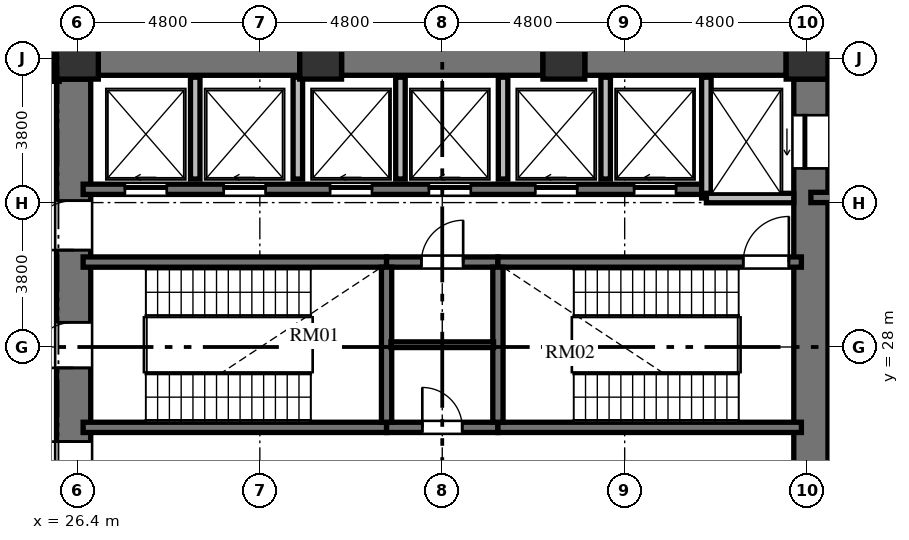
"""IFC4 building model, lengths in metres.
Left out: names, types, materials, properties, quantities, classifications, styles, units other than length and angle.
Written with IfcOpenShell. Run it as: python <this file> out.ifc"""

import sys

from ifc_helpers import new_model, si_unit, direction, frame, frame_2d, origin, origin_2d, place, context, subcontext, project, spatial, rectangle, extrude, element, fill, save


model = new_model("IFC4")
c1 = context("Model", 3, precision=1e-05, world=origin(), true_north=direction((0.0, 1.0)))
c2 = subcontext(c1, "Body", "Model", "MODEL_VIEW")
j1 = project(units=[si_unit("LENGTHUNIT", "METRE"), si_unit("PLANEANGLEUNIT", "RADIAN")], contexts=[c1])
p1 = place(None, origin())
s1 = spatial("IfcSite", under=j1, at=p1, CompositionType="ELEMENT")
p2 = place(p1, origin())
s2 = spatial("IfcBuilding", under=s1, at=p2, CompositionType="ELEMENT")
p3 = place(p2, frame((0.0, 0.0, 6.0)))
s3 = spatial("IfcBuildingStorey", under=s2, at=p3, CompositionType="ELEMENT", Elevation=6.0)
for number, where, z_axis, x_axis in (
    (1, (45.6, 35.6, 0.0), (0.0, 0.0, 1.0), (1.0, 0.0, 0.0)),
    (2, (39.2, 35.6, 0.0), (0.0, 0.0, 1.0), (1.0, 0.0, 0.0)),
    (3, (32.8, 35.6, 0.0), (0.0, 0.0, 1.0), (1.0, 0.0, 0.0)),
    (4, (26.4, 35.6, 0.0), (0.0, 0.0, 1.0), (1.0, 0.0, 0.0)),
):
    element("IfcColumn", number, at=place(p3, frame(where, z_axis=z_axis, x_axis=x_axis)), inside=s3, PredefinedType="COLUMN", context=c2, shape_type="SweptSolid", body=[
        extrude(rectangle(XDim=1.1, YDim=1.1, at=origin_2d()), origin(), (0.0, 0.0, 1.0), 4.8),
    ])
p4 = place(p3, frame((26.3, 20.95, 0.0), z_axis=(0.0, 0.0, 1.0), x_axis=(0.0, 1.0, 0.0)))
e5 = element("IfcWall", 5, at=p4, inside=s3, PredefinedType="SHEAR", context=c2, shape_type="SweptSolid", body=[
    extrude(rectangle(XDim=14.1, YDim=0.9, at=frame_2d((7.05, 0.0))), origin(), (0.0, 0.0, 1.0), 4.8),
])
p5 = place(p4, frame((6.5, 0.0, 0.0)))
e6 = element("IfcOpeningElement", 6, at=p5, cuts=e5, PredefinedType="OPENING", context=c2, shape_type="SweptSolid", body=[
    extrude(rectangle(XDim=1.2, YDim=2.15, at=frame_2d((0.6, 1.075))), frame((0.0, 0.46, 0.0), z_axis=(0.0, -1.0, 0.0), x_axis=(1.0, 0.0, 0.0)), (0.0, 0.0, 1.0), 0.92),
])
p6 = place(p4, frame((9.6, 0.0, 0.0)))
e7 = element("IfcOpeningElement", 7, at=p6, cuts=e5, PredefinedType="OPENING", context=c2, shape_type="SweptSolid", body=[
    extrude(rectangle(XDim=1.3, YDim=2.2, at=frame_2d((0.65, 1.1))), frame((0.0, 0.46, 0.0), z_axis=(0.0, -1.0, 0.0), x_axis=(1.0, 0.0, 0.0)), (0.0, 0.0, 1.0), 0.92),
])
p7 = place(p4, frame((3.26, 0.0, 0.0)))
e8 = element("IfcOpeningElement", 8, at=p7, cuts=e5, PredefinedType="OPENING", context=c2, shape_type="SweptSolid", body=[
    extrude(rectangle(XDim=1.3, YDim=2.2, at=frame_2d((0.65, 1.1))), frame((0.0, 0.46, 0.0), z_axis=(0.0, -1.0, 0.0), x_axis=(1.0, 0.0, 0.0)), (0.0, 0.0, 1.0), 0.92),
])
p8 = place(p3, frame((45.7, 20.95, 0.0), z_axis=(0.0, 0.0, 1.0), x_axis=(0.0, 1.0, 0.0)))
e9 = element("IfcWall", 9, at=p8, inside=s3, PredefinedType="SHEAR", context=c2, shape_type="SweptSolid", body=[
    extrude(rectangle(XDim=14.1, YDim=0.9, at=frame_2d((7.05, 0.0))), origin(), (0.0, 0.0, 1.0), 4.8),
])
p9 = place(p8, frame((11.75, 0.0, 0.0)))
e10 = element("IfcOpeningElement", 10, at=p9, cuts=e9, PredefinedType="OPENING", context=c2, shape_type="SweptSolid", body=[
    extrude(rectangle(XDim=1.4, YDim=2.3, at=frame_2d((0.7, 1.15))), frame((0.0, 0.46, 0.0), z_axis=(0.0, -1.0, 0.0), x_axis=(1.0, 0.0, 0.0)), (0.0, 0.0, 1.0), 0.92),
])
p10 = place(p8, frame((0.95, 0.0, 0.0)))
e11 = element("IfcOpeningElement", 11, at=p10, cuts=e9, PredefinedType="OPENING", context=c2, shape_type="SweptSolid", body=[
    extrude(rectangle(XDim=1.4, YDim=2.3, at=frame_2d((0.7, 1.15))), frame((0.0, 0.46, 0.0), z_axis=(0.0, -1.0, 0.0), x_axis=(1.0, 0.0, 0.0)), (0.0, 0.0, 1.0), 0.92),
])
p11 = place(p3, frame((26.95, 35.6, 0.0), z_axis=(0.0, 0.0, 1.0), x_axis=(1.0, 0.0, 0.0)))
e12 = element("IfcWall", 12, at=p11, inside=s3, PredefinedType="SHEAR", context=c2, shape_type="SweptSolid", body=[
    extrude(rectangle(XDim=5.3, YDim=0.9, at=frame_2d((2.65, 0.0))), origin(), (0.0, 0.0, 1.0), 4.8),
])
p12 = place(p3, frame((33.35, 35.6, 0.0), z_axis=(0.0, 0.0, 1.0), x_axis=(1.0, 0.0, 0.0)))
e13 = element("IfcWall", 13, at=p12, inside=s3, PredefinedType="SHEAR", context=c2, shape_type="SweptSolid", body=[
    extrude(rectangle(XDim=5.3, YDim=0.9, at=frame_2d((2.65, 0.0))), origin(), (0.0, 0.0, 1.0), 4.8),
])
p13 = place(p3, frame((39.75, 35.6, 0.0), z_axis=(0.0, 0.0, 1.0), x_axis=(1.0, 0.0, 0.0)))
e14 = element("IfcWall", 14, at=p13, inside=s3, PredefinedType="SHEAR", context=c2, shape_type="SweptSolid", body=[
    extrude(rectangle(XDim=5.3, YDim=0.9, at=frame_2d((2.65, 0.0))), origin(), (0.0, 0.0, 1.0), 4.8),
])
p14 = place(p3, frame((26.55, 30.235, 0.0), z_axis=(0.0, 0.0, 1.0), x_axis=(1.0, 0.0, 0.0)))
e15 = element("IfcWall", 15, at=p14, inside=s3, PredefinedType="SHEAR", context=c2, shape_type="SweptSolid", body=[
    extrude(rectangle(XDim=7.985, YDim=0.27, at=frame_2d((3.992, 0.0))), origin(), (0.0, 0.0, 1.0), 4.8),
])
p15 = place(p3, frame((34.535, 30.235, 0.0), z_axis=(0.0, 0.0, 1.0), x_axis=(1.0, 0.0, 0.0)))
e16 = element("IfcWall", 16, at=p15, inside=s3, PredefinedType="SHEAR", context=c2, shape_type="SweptSolid", body=[
    extrude(rectangle(XDim=2.93, YDim=0.27, at=frame_2d((1.465, 0.0))), origin(), (0.0, 0.0, 1.0), 4.8),
])
p16 = place(p15, frame((0.915, 0.0, 0.0)))
e17 = element("IfcOpeningElement", 17, at=p16, cuts=e16, PredefinedType="OPENING", context=c2, shape_type="SweptSolid", body=[
    extrude(rectangle(XDim=1.1, YDim=2.15, at=frame_2d((0.55, 1.075))), frame((0.0, 0.145, 0.0), z_axis=(0.0, -1.0, 0.0), x_axis=(1.0, 0.0, 0.0)), (0.0, 0.0, 1.0), 0.29),
])
p17 = place(p3, frame((37.465, 30.235, 0.0), z_axis=(0.0, 0.0, 1.0), x_axis=(1.0, 0.0, 0.0)))
e18 = element("IfcWall", 18, at=p17, inside=s3, PredefinedType="SHEAR", context=c2, shape_type="SweptSolid", body=[
    extrude(rectangle(XDim=7.985, YDim=0.27, at=frame_2d((3.992, 0.0))), origin(), (0.0, 0.0, 1.0), 4.8),
])
p18 = place(p17, frame((6.455, 0.0, 0.0)))
e19 = element("IfcOpeningElement", 19, at=p18, cuts=e18, PredefinedType="OPENING", context=c2, shape_type="SweptSolid", body=[
    extrude(rectangle(XDim=1.2, YDim=2.15, at=frame_2d((0.6, 1.075))), frame((0.0, 0.145, 0.0), z_axis=(0.0, -1.0, 0.0), x_axis=(1.0, 0.0, 0.0)), (0.0, 0.0, 1.0), 0.29),
])
p19 = place(p3, frame((26.55, 25.885, 0.0), z_axis=(0.0, 0.0, 1.0), x_axis=(1.0, 0.0, 0.0)))
e20 = element("IfcWall", 20, at=p19, inside=s3, PredefinedType="SHEAR", context=c2, shape_type="SweptSolid", body=[
    extrude(rectangle(XDim=7.985, YDim=0.27, at=frame_2d((3.992, 0.0))), origin(), (0.0, 0.0, 1.0), 4.8),
])
p20 = place(p3, frame((34.535, 25.885, 0.0), z_axis=(0.0, 0.0, 1.0), x_axis=(1.0, 0.0, 0.0)))
e21 = element("IfcWall", 21, at=p20, inside=s3, PredefinedType="SHEAR", context=c2, shape_type="SweptSolid", body=[
    extrude(rectangle(XDim=2.93, YDim=0.27, at=frame_2d((1.465, 0.0))), origin(), (0.0, 0.0, 1.0), 4.8),
])
p21 = place(p20, frame((0.94, 0.0, 0.0)))
e22 = element("IfcOpeningElement", 22, at=p21, cuts=e21, PredefinedType="OPENING", context=c2, shape_type="SweptSolid", body=[
    extrude(rectangle(XDim=1.05, YDim=2.15, at=frame_2d((0.525, 1.075))), frame((0.0, 0.145, 0.0), z_axis=(0.0, -1.0, 0.0), x_axis=(1.0, 0.0, 0.0)), (0.0, 0.0, 1.0), 0.29),
])
p22 = place(p3, frame((37.465, 25.885, 0.0), z_axis=(0.0, 0.0, 1.0), x_axis=(1.0, 0.0, 0.0)))
e23 = element("IfcWall", 23, at=p22, inside=s3, PredefinedType="SHEAR", context=c2, shape_type="SweptSolid", body=[
    extrude(rectangle(XDim=7.985, YDim=0.27, at=frame_2d((3.992, 0.0))), origin(), (0.0, 0.0, 1.0), 4.8),
])
for number, where, z_axis, x_axis in (
    (24, (34.535, 26.02, 0.0), (0.0, 0.0, 1.0), (0.0, 1.0, 0.0)),
    (25, (37.465, 26.02, 0.0), (0.0, 0.0, 1.0), (0.0, 1.0, 0.0)),
):
    element("IfcWall", number, at=place(p3, frame(where, z_axis=z_axis, x_axis=x_axis)), inside=s3, PredefinedType="SHEAR", context=c2, shape_type="SweptSolid", body=[
        extrude(rectangle(XDim=4.08, YDim=0.27, at=frame_2d((2.04, 0.0))), origin(), (0.0, 0.0, 1.0), 4.8),
    ])
p23 = place(p3, frame((34.65, 28.06, 0.0), z_axis=(0.0, 0.0, 1.0), x_axis=(1.0, 0.0, 0.0)))
e26 = element("IfcWall", 26, at=p23, inside=s3, PredefinedType="PARTITIONING", context=c2, shape_type="SweptSolid", body=[
    extrude(rectangle(XDim=2.7, YDim=0.15, at=frame_2d((1.35, 0.0))), origin(), (0.0, 0.0, 1.0), 4.52),
])
p24 = place(p3, frame((26.55, 32.15, 0.0), z_axis=(0.0, 0.0, 1.0), x_axis=(1.0, 0.0, 0.0)))
e27 = element("IfcWall", 27, at=p24, inside=s3, PredefinedType="SHEAR", context=c2, shape_type="SweptSolid", body=[
    extrude(rectangle(XDim=16.4, YDim=0.27, at=frame_2d((8.2, 0.0))), origin(), (0.0, 0.0, 1.0), 4.8),
])
p25 = place(p24, frame((1.1, 0.0, 0.0)))
e28 = element("IfcOpeningElement", 28, at=p25, cuts=e27, PredefinedType="OPENING", context=c2, shape_type="SweptSolid", body=[
    extrude(rectangle(XDim=1.1, YDim=2.2, at=frame_2d((0.55, 1.1))), frame((0.0, 0.145, 0.0), z_axis=(0.0, -1.0, 0.0), x_axis=(1.0, 0.0, 0.0)), (0.0, 0.0, 1.0), 0.29),
])
p26 = place(p24, frame((3.7, 0.0, 0.0)))
e29 = element("IfcOpeningElement", 29, at=p26, cuts=e27, PredefinedType="OPENING", context=c2, shape_type="SweptSolid", body=[
    extrude(rectangle(XDim=1.1, YDim=2.2, at=frame_2d((0.55, 1.1))), frame((0.0, 0.145, 0.0), z_axis=(0.0, -1.0, 0.0), x_axis=(1.0, 0.0, 0.0)), (0.0, 0.0, 1.0), 0.29),
])
p27 = place(p24, frame((6.5, 0.0, 0.0)))
e30 = element("IfcOpeningElement", 30, at=p27, cuts=e27, PredefinedType="OPENING", context=c2, shape_type="SweptSolid", body=[
    extrude(rectangle(XDim=1.1, YDim=2.2, at=frame_2d((0.55, 1.1))), frame((0.0, 0.145, 0.0), z_axis=(0.0, -1.0, 0.0), x_axis=(1.0, 0.0, 0.0)), (0.0, 0.0, 1.0), 0.29),
])
p28 = place(p24, frame((9.1, 0.0, 0.0)))
e31 = element("IfcOpeningElement", 31, at=p28, cuts=e27, PredefinedType="OPENING", context=c2, shape_type="SweptSolid", body=[
    extrude(rectangle(XDim=1.1, YDim=2.2, at=frame_2d((0.55, 1.1))), frame((0.0, 0.145, 0.0), z_axis=(0.0, -1.0, 0.0), x_axis=(1.0, 0.0, 0.0)), (0.0, 0.0, 1.0), 0.29),
])
p29 = place(p24, frame((11.9, 0.0, 0.0)))
e32 = element("IfcOpeningElement", 32, at=p29, cuts=e27, PredefinedType="OPENING", context=c2, shape_type="SweptSolid", body=[
    extrude(rectangle(XDim=1.1, YDim=2.2, at=frame_2d((0.55, 1.1))), frame((0.0, 0.145, 0.0), z_axis=(0.0, -1.0, 0.0), x_axis=(1.0, 0.0, 0.0)), (0.0, 0.0, 1.0), 0.29),
])
p30 = place(p24, frame((14.5, 0.0, 0.0)))
e33 = element("IfcOpeningElement", 33, at=p30, cuts=e27, PredefinedType="OPENING", context=c2, shape_type="SweptSolid", body=[
    extrude(rectangle(XDim=1.1, YDim=2.2, at=frame_2d((0.55, 1.1))), frame((0.0, 0.145, 0.0), z_axis=(0.0, -1.0, 0.0), x_axis=(1.0, 0.0, 0.0)), (0.0, 0.0, 1.0), 0.29),
])
p31 = place(p3, frame((42.95, 31.92, 0.0), z_axis=(0.0, 0.0, 1.0), x_axis=(0.0, 1.0, 0.0)))
e34 = element("IfcWall", 34, at=p31, inside=s3, PredefinedType="SOLIDWALL", context=c2, shape_type="SweptSolid", body=[
    extrude(rectangle(XDim=3.18, YDim=0.25, at=frame_2d((1.59, 0.0))), origin(), (0.0, 0.0, 1.0), 4.52),
])
p32 = place(p3, frame((42.95, 31.92, 0.0), z_axis=(0.0, 0.0, 1.0), x_axis=(1.0, 0.0, 0.0)))
e35 = element("IfcWall", 35, at=p32, inside=s3, PredefinedType="SOLIDWALL", context=c2, shape_type="SweptSolid", body=[
    extrude(rectangle(XDim=2.3, YDim=0.25, at=frame_2d((1.15, 0.0))), origin(), (0.0, 0.0, 1.0), 4.52),
])
for number, where, z_axis, x_axis in (
    (36, (29.5, 32.42, 0.0), (0.0, 0.0, 1.0), (0.0, 1.0, 0.0)),
    (37, (32.2, 32.42, 0.0), (0.0, 0.0, 1.0), (0.0, 1.0, 0.0)),
    (38, (34.9, 32.42, 0.0), (0.0, 0.0, 1.0), (0.0, 1.0, 0.0)),
    (39, (37.6, 32.42, 0.0), (0.0, 0.0, 1.0), (0.0, 1.0, 0.0)),
    (40, (40.3, 32.42, 0.0), (0.0, 0.0, 1.0), (0.0, 1.0, 0.0)),
):
    element("IfcWall", number, at=place(p3, frame(where, z_axis=z_axis, x_axis=x_axis)), inside=s3, PredefinedType="SOLIDWALL", context=c2, shape_type="SweptSolid", body=[
        extrude(rectangle(XDim=2.68, YDim=0.25, at=frame_2d((1.34, 0.0))), origin(), (0.0, 0.0, 1.0), 4.52),
    ])
p33 = place(p3, frame((45.7, 31.935, 0.0), z_axis=(0.0, 0.0, 1.0), x_axis=(1.0, 0.0, 0.0)))
e41 = element("IfcWall", 41, at=p33, inside=s3, PredefinedType="SHEAR", context=c2, shape_type="SweptSolid", body=[
    extrude(rectangle(XDim=4.715, YDim=0.27, at=frame_2d((2.357, 0.0))), origin(), (0.0, 0.0, 1.0), 4.8),
])
p34 = place(p3, frame((25.83, 36.21, 0.0), z_axis=(0.0, 0.0, 1.0), x_axis=(0.0, -1.0, 0.0)))
e42 = element("IfcWall", 42, at=p34, inside=s3, PredefinedType="PARTITIONING", context=c2, shape_type="SweptSolid", body=[
    extrude(rectangle(XDim=1.22, YDim=0.18, at=frame_2d((0.61, 0.0))), origin(), (0.0, 0.0, 1.0), 4.52),
])
p35 = place(p5, origin())
e43 = element("IfcDoor", 43, at=p35, inside=s3, OperationType="SINGLE_SWING_LEFT", PredefinedType="DOOR", context=c2, shape_type="SweptSolid", body=[
    extrude(rectangle(XDim=1.2, YDim=2.15, at=frame_2d((0.6, 1.075))), frame((0.0, 0.025, 0.0), z_axis=(0.0, -1.0, 0.0), x_axis=(1.0, 0.0, 0.0)), (0.0, 0.0, 1.0), 0.05),
])
fill(e6, e43)
p36 = place(p18, origin())
e44 = element("IfcDoor", 44, at=p36, inside=s3, OperationType="SINGLE_SWING_RIGHT", PredefinedType="DOOR", context=c2, shape_type="SweptSolid", body=[
    extrude(rectangle(XDim=1.2, YDim=2.15, at=frame_2d((0.6, 1.075))), frame((0.0, 0.025, 0.0), z_axis=(0.0, -1.0, 0.0), x_axis=(1.0, 0.0, 0.0)), (0.0, 0.0, 1.0), 0.05),
])
fill(e19, e44)
p37 = place(p21, origin())
e45 = element("IfcDoor", 45, at=p37, inside=s3, OperationType="SINGLE_SWING_LEFT", PredefinedType="DOOR", context=c2, shape_type="SweptSolid", body=[
    extrude(rectangle(XDim=1.05, YDim=2.15, at=frame_2d((0.525, 1.075))), frame((0.0, 0.025, 0.0), z_axis=(0.0, -1.0, 0.0), x_axis=(1.0, 0.0, 0.0)), (0.0, 0.0, 1.0), 0.05),
])
fill(e22, e45)
p38 = place(p16, origin())
e46 = element("IfcDoor", 46, at=p38, inside=s3, OperationType="SINGLE_SWING_RIGHT", PredefinedType="DOOR", context=c2, shape_type="SweptSolid", body=[
    extrude(rectangle(XDim=1.1, YDim=2.15, at=frame_2d((0.55, 1.075))), frame((0.0, 0.025, 0.0), z_axis=(0.0, -1.0, 0.0), x_axis=(1.0, 0.0, 0.0)), (0.0, 0.0, 1.0), 0.05),
])
fill(e17, e46)
p39 = place(p6, origin())
e47 = element("IfcDoor", 47, at=p39, inside=s3, OperationType="SINGLE_SWING_LEFT", PredefinedType="DOOR", context=c2, shape_type="SweptSolid", body=[
    extrude(rectangle(XDim=1.3, YDim=2.2, at=frame_2d((0.65, 1.1))), frame((0.0, 0.025, 0.0), z_axis=(0.0, -1.0, 0.0), x_axis=(1.0, 0.0, 0.0)), (0.0, 0.0, 1.0), 0.05),
])
fill(e7, e47)
p40 = place(p7, origin())
e48 = element("IfcDoor", 48, at=p40, inside=s3, OperationType="SINGLE_SWING_RIGHT", PredefinedType="DOOR", context=c2, shape_type="SweptSolid", body=[
    extrude(rectangle(XDim=1.3, YDim=2.2, at=frame_2d((0.65, 1.1))), frame((0.0, 0.025, 0.0), z_axis=(0.0, -1.0, 0.0), x_axis=(1.0, 0.0, 0.0)), (0.0, 0.0, 1.0), 0.05),
])
fill(e8, e48)
p41 = place(p25, origin())
e49 = element("IfcDoor", 49, at=p41, inside=s3, OperationType="SLIDING_TO_LEFT", PredefinedType="DOOR", context=c2, shape_type="SweptSolid", body=[
    extrude(rectangle(XDim=1.1, YDim=2.2, at=frame_2d((0.55, 1.1))), frame((0.0, 0.025, 0.0), z_axis=(0.0, -1.0, 0.0), x_axis=(1.0, 0.0, 0.0)), (0.0, 0.0, 1.0), 0.05),
])
fill(e28, e49)
p42 = place(p26, origin())
e50 = element("IfcDoor", 50, at=p42, inside=s3, OperationType="SLIDING_TO_LEFT", PredefinedType="DOOR", context=c2, shape_type="SweptSolid", body=[
    extrude(rectangle(XDim=1.1, YDim=2.2, at=frame_2d((0.55, 1.1))), frame((0.0, 0.025, 0.0), z_axis=(0.0, -1.0, 0.0), x_axis=(1.0, 0.0, 0.0)), (0.0, 0.0, 1.0), 0.05),
])
fill(e29, e50)
p43 = place(p27, origin())
e51 = element("IfcDoor", 51, at=p43, inside=s3, OperationType="SLIDING_TO_LEFT", PredefinedType="DOOR", context=c2, shape_type="SweptSolid", body=[
    extrude(rectangle(XDim=1.1, YDim=2.2, at=frame_2d((0.55, 1.1))), frame((0.0, 0.025, 0.0), z_axis=(0.0, -1.0, 0.0), x_axis=(1.0, 0.0, 0.0)), (0.0, 0.0, 1.0), 0.05),
])
fill(e30, e51)
p44 = place(p28, origin())
e52 = element("IfcDoor", 52, at=p44, inside=s3, OperationType="SLIDING_TO_LEFT", PredefinedType="DOOR", context=c2, shape_type="SweptSolid", body=[
    extrude(rectangle(XDim=1.1, YDim=2.2, at=frame_2d((0.55, 1.1))), frame((0.0, 0.025, 0.0), z_axis=(0.0, -1.0, 0.0), x_axis=(1.0, 0.0, 0.0)), (0.0, 0.0, 1.0), 0.05),
])
fill(e31, e52)
p45 = place(p29, origin())
e53 = element("IfcDoor", 53, at=p45, inside=s3, OperationType="SLIDING_TO_LEFT", PredefinedType="DOOR", context=c2, shape_type="SweptSolid", body=[
    extrude(rectangle(XDim=1.1, YDim=2.2, at=frame_2d((0.55, 1.1))), frame((0.0, 0.025, 0.0), z_axis=(0.0, -1.0, 0.0), x_axis=(1.0, 0.0, 0.0)), (0.0, 0.0, 1.0), 0.05),
])
fill(e32, e53)
p46 = place(p30, origin())
e54 = element("IfcDoor", 54, at=p46, inside=s3, OperationType="SLIDING_TO_LEFT", PredefinedType="DOOR", context=c2, shape_type="SweptSolid", body=[
    extrude(rectangle(XDim=1.1, YDim=2.2, at=frame_2d((0.55, 1.1))), frame((0.0, 0.025, 0.0), z_axis=(0.0, -1.0, 0.0), x_axis=(1.0, 0.0, 0.0)), (0.0, 0.0, 1.0), 0.05),
])
fill(e33, e54)
p47 = place(p9, origin())
e55 = element("IfcDoor", 55, at=p47, inside=s3, OperationType="SLIDING_TO_LEFT", PredefinedType="DOOR", context=c2, shape_type="SweptSolid", body=[
    extrude(rectangle(XDim=1.4, YDim=2.3, at=frame_2d((0.7, 1.15))), frame((0.0, 0.025, 0.0), z_axis=(0.0, -1.0, 0.0), x_axis=(1.0, 0.0, 0.0)), (0.0, 0.0, 1.0), 0.05),
])
fill(e10, e55)
save(model, sys.argv[1])
